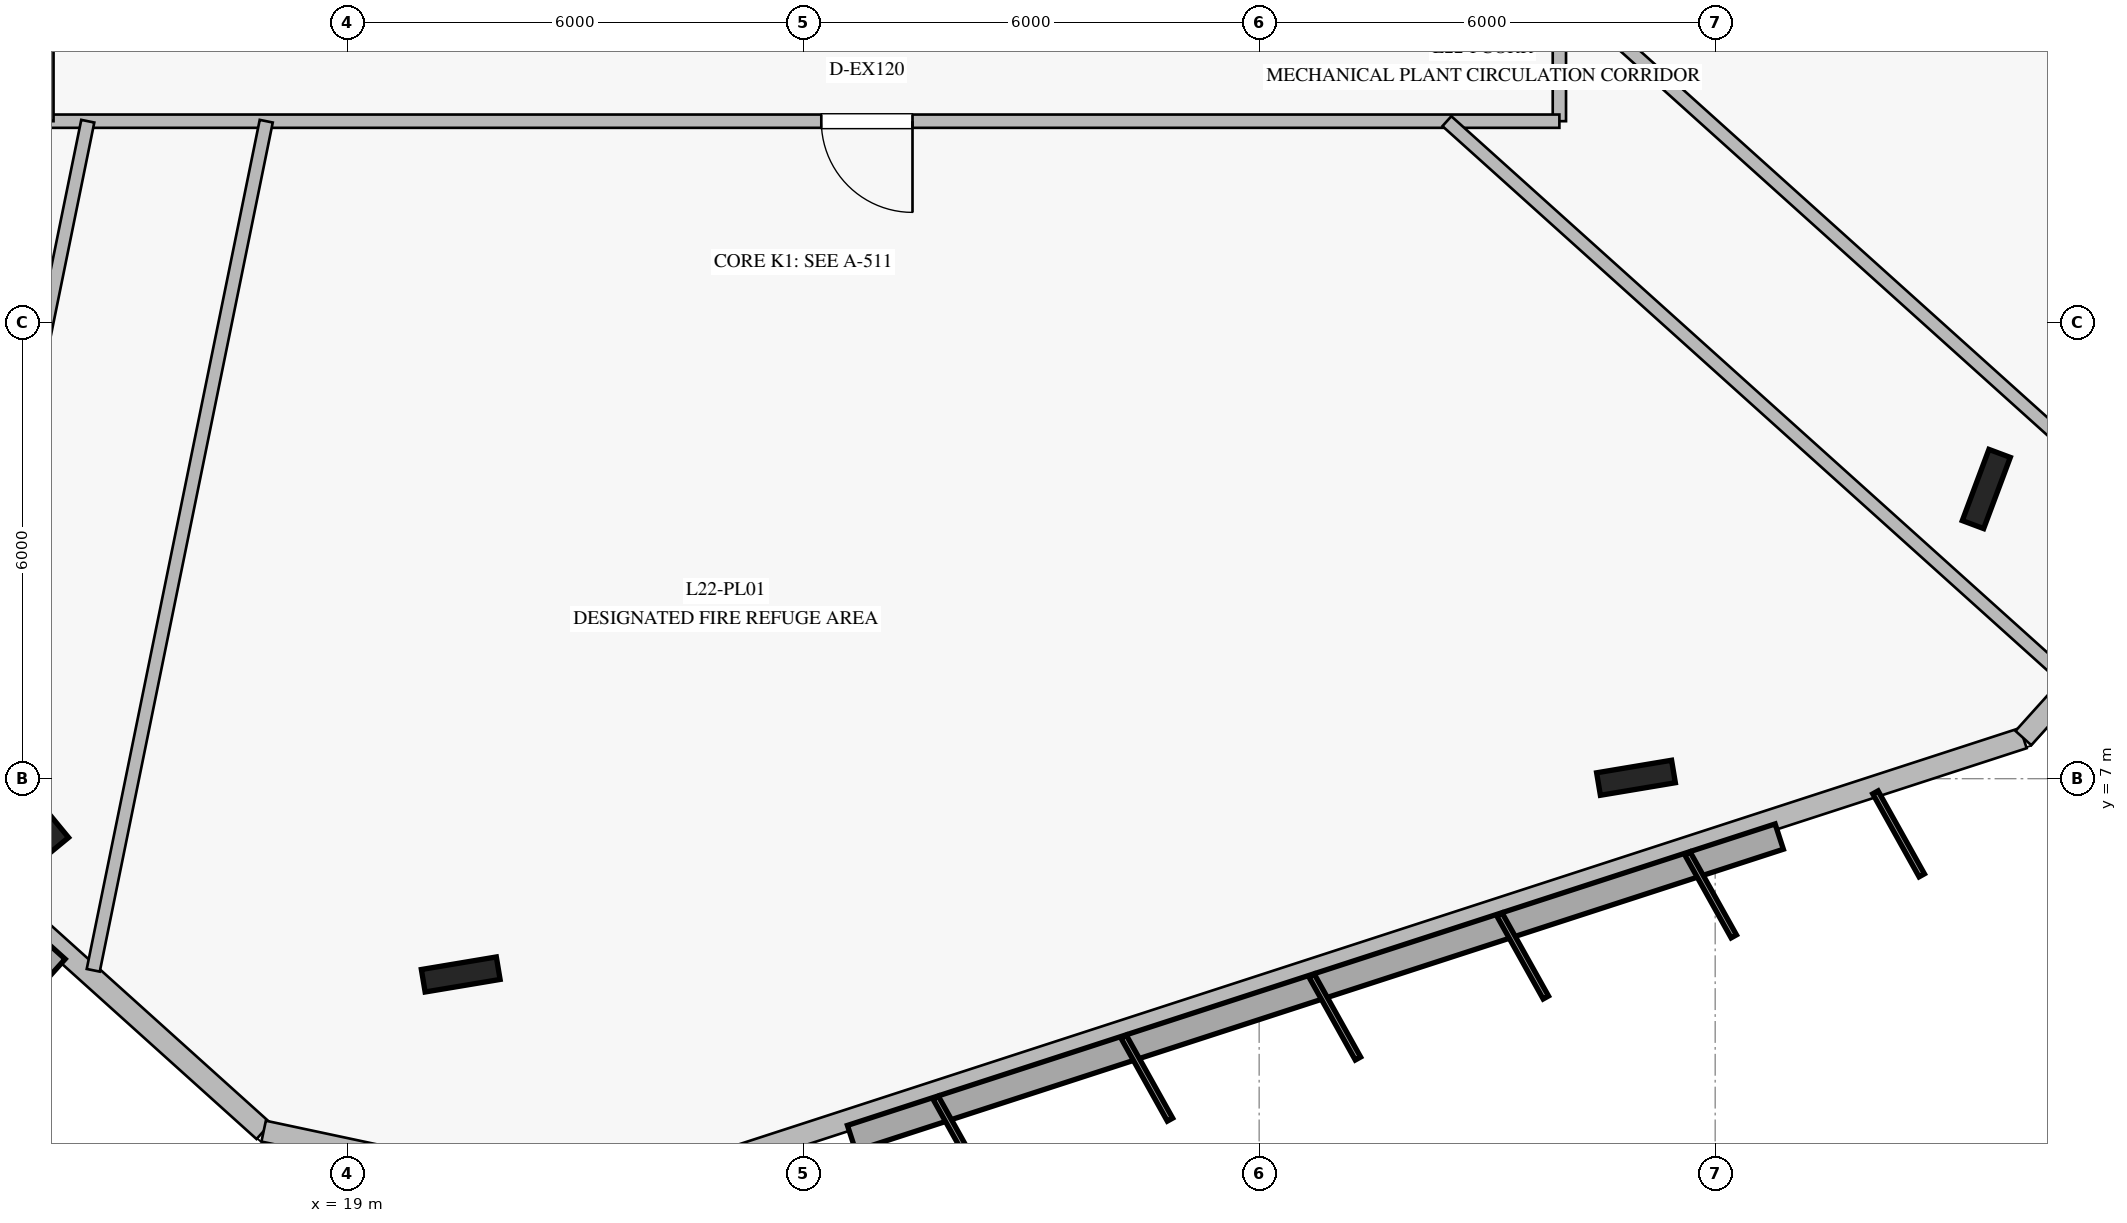
"""IFC4 building model, lengths in metres.
Left out: names, types, materials, properties, quantities, classifications, styles, units other than length and angle.
Written with IfcOpenShell. Run it as: python <this file> out.ifc"""

import sys

from ifc_helpers import new_model, si_unit, direction, frame, frame_2d, origin, origin_2d, place, context, subcontext, project, spatial, rectangle, i_section, extrude, element, fill, save


model = new_model("IFC4")
c1 = context("Model", 3, precision=1e-05, world=origin(), true_north=direction((0.0, 1.0)))
c2 = subcontext(c1, "Body", "Model", "MODEL_VIEW")
j1 = project(units=[si_unit("LENGTHUNIT", "METRE"), si_unit("PLANEANGLEUNIT", "RADIAN")], contexts=[c1])
p1 = place(None, origin())
s1 = spatial("IfcSite", under=j1, at=p1, CompositionType="ELEMENT")
p2 = place(p1, origin())
s2 = spatial("IfcBuilding", under=s1, at=p2, CompositionType="ELEMENT")
p3 = place(p2, frame((0.0, 0.0, 92.0)))
s3 = spatial("IfcBuildingStorey", under=s2, at=p3, CompositionType="ELEMENT", Elevation=92.0)
for number, where, z_axis, x_axis in (
    (1, (14.901, 6.516, 0.0), (0.0, 0.0, 1.0), (-0.636, 0.772, 0.0)),
    (2, (20.495, 4.424, 0.0), (0.0, 0.0, 1.0), (0.986, 0.165, 0.0)),
    (3, (35.958, 7.012, 0.0), (0.0, 0.0, 1.0), (0.986, 0.165, 0.0)),
    (4, (40.567, 10.811, 0.0), (0.0, 0.0, 1.0), (0.35, 0.937, 0.0)),
):
    element("IfcColumn", number, at=place(p3, frame(where, z_axis=z_axis, x_axis=x_axis)), inside=s3, PredefinedType="COLUMN", context=c2, shape_type="SweptSolid", body=[
        extrude(i_section(OverallWidth=0.3, OverallDepth=1.0, WebThickness=0.019, FlangeThickness=0.036, at=origin_2d()), origin(), (0.0, 0.0, 1.0), 5.4),
    ])
p4 = place(p3, frame((3.228, 15.575, 0.0), z_axis=(0.0, 0.0, 1.0), x_axis=(0.743161948842, -0.669111588446, 0.0)))
e5 = element("IfcWall", 5, at=p4, inside=s3, PredefinedType="STANDARD", context=c2, shape_type="SweptSolid", body=[
    extrude(rectangle(XDim=19.745, YDim=0.28, at=frame_2d((9.873, 0.0))), origin(), (0.0, 0.0, 1.0), 5.14),
])
p5 = place(p3, frame((17.902, 2.363, 0.0), z_axis=(0.0, 0.0, 1.0), x_axis=(0.978092216597, -0.20817208226, 0.0)))
e6 = element("IfcWall", 6, at=p5, inside=s3, PredefinedType="STANDARD", context=c2, shape_type="SweptSolid", body=[
    extrude(rectangle(XDim=4.473, YDim=0.28, at=frame_2d((2.236, 0.0))), origin(), (0.0, 0.0, 1.0), 5.14),
])
p6 = place(p3, frame((22.277, 1.432, 0.0), z_axis=(0.0, 0.0, 1.0), x_axis=(0.951045154023, 0.309051961667, 0.0)))
e7 = element("IfcWall", 7, at=p6, inside=s3, PredefinedType="STANDARD", context=c2, shape_type="SweptSolid", body=[
    extrude(rectangle(XDim=19.744, YDim=0.28, at=frame_2d((9.872, 0.0))), origin(), (0.0, 0.0, 1.0), 5.14),
])
p7 = place(p3, frame((41.055, 7.534, 0.0), z_axis=(0.0, 0.0, 1.0), x_axis=(0.669281253692, 0.743009154356, 0.0)))
e8 = element("IfcWall", 8, at=p7, inside=s3, PredefinedType="STANDARD", context=c2, shape_type="SweptSolid", body=[
    extrude(rectangle(XDim=4.474, YDim=0.28, at=frame_2d((2.237, 0.0))), origin(), (0.0, 0.0, 1.0), 5.14),
])
p8 = place(p3, frame((34.95, 34.35, 0.0), z_axis=(0.0, 0.0, 1.0), x_axis=(0.0, -1.0, 0.0)))
e9 = element("IfcWall", 9, at=p8, inside=s3, PredefinedType="PARTITIONING", context=c2, shape_type="SweptSolid", body=[
    extrude(rectangle(XDim=18.7, YDim=0.175, at=frame_2d((9.35, 0.0))), origin(), (0.0, 0.0, 1.0), 3.54),
])
p9 = place(p8, frame((8.013, 0.0, 0.0)))
e10 = element("IfcOpeningElement", 10, at=p9, cuts=e9, PredefinedType="OPENING", context=c2, shape_type="SweptSolid", body=[
    extrude(rectangle(XDim=1.15, YDim=2.2, at=frame_2d((0.575, 1.1))), frame((0.0, 0.098, 0.0), z_axis=(0.0, -1.0, 0.0), x_axis=(1.0, 0.0, 0.0)), (0.0, 0.0, 1.0), 0.195),
])
p10 = place(p3, frame((34.95, 15.65, 0.0), z_axis=(0.0, 0.0, 1.0), x_axis=(-1.0, 0.0, 0.0)))
e11 = element("IfcWall", 11, at=p10, inside=s3, PredefinedType="PARTITIONING", context=c2, shape_type="SweptSolid", body=[
    extrude(rectangle(XDim=19.9, YDim=0.175, at=frame_2d((9.95, 0.0))), origin(), (0.0, 0.0, 1.0), 3.54),
])
p11 = place(p10, frame((8.511, 0.0, 0.0)))
e12 = element("IfcOpeningElement", 12, at=p11, cuts=e11, PredefinedType="OPENING", context=c2, shape_type="SweptSolid", body=[
    extrude(rectangle(XDim=1.2, YDim=2.25, at=frame_2d((0.6, 1.125))), frame((0.0, 0.098, 0.0), z_axis=(0.0, -1.0, 0.0), x_axis=(1.0, 0.0, 0.0)), (0.0, 0.0, 1.0), 0.195),
])
p12 = place(p3, frame((15.05, 15.65, 0.0), z_axis=(0.0, 0.0, 1.0), x_axis=(0.0, 1.0, 0.0)))
e13 = element("IfcWall", 13, at=p12, inside=s3, PredefinedType="PARTITIONING", context=c2, shape_type="SweptSolid", body=[
    extrude(rectangle(XDim=18.7, YDim=0.175, at=frame_2d((9.35, 0.0))), origin(), (0.0, 0.0, 1.0), 3.54),
])
p13 = place(p12, frame((8.191, 0.0, 0.0)))
e14 = element("IfcOpeningElement", 14, at=p13, cuts=e13, PredefinedType="OPENING", context=c2, shape_type="SweptSolid", body=[
    extrude(rectangle(XDim=1.15, YDim=2.2, at=frame_2d((0.575, 1.1))), frame((0.0, 0.098, 0.0), z_axis=(0.0, -1.0, 0.0), x_axis=(1.0, 0.0, 0.0)), (0.0, 0.0, 1.0), 0.195),
])
p14 = place(p3, frame((15.588, 15.65, 0.0), z_axis=(0.0, 0.0, 1.0), x_axis=(-0.199614906569, -0.979874425156, 0.0)))
e15 = element("IfcWall", 15, at=p14, inside=s3, PredefinedType="PARTITIONING", context=c2, shape_type="SweptSolid", body=[
    extrude(rectangle(XDim=9.578, YDim=0.175, at=frame_2d((4.789, 0.0))), origin(), (0.0, 0.0, 1.0), 3.53),
])
p15 = place(p3, frame((17.936, 15.65, 0.0), z_axis=(0.0, 0.0, 1.0), x_axis=(-0.199652459502, -0.979866774319, 0.0)))
e16 = element("IfcWall", 16, at=p15, inside=s3, PredefinedType="PARTITIONING", context=c2, shape_type="SweptSolid", body=[
    extrude(rectangle(XDim=11.4, YDim=0.175, at=frame_2d((5.7, 0.0))), origin(), (0.0, 0.0, 1.0), 3.53),
])
p16 = place(p3, frame((33.47, 15.65, 0.0), z_axis=(0.0, 0.0, 1.0), x_axis=(0.743388992032, -0.66885933239, 0.0)))
e17 = element("IfcWall", 17, at=p16, inside=s3, PredefinedType="PARTITIONING", context=c2, shape_type="SweptSolid", body=[
    extrude(rectangle(XDim=11.007, YDim=0.175, at=frame_2d((5.503, 0.0))), origin(), (0.0, 0.0, 1.0), 3.53),
])
p17 = place(p3, frame((34.95, 17.412, 0.0), z_axis=(0.0, 0.0, 1.0), x_axis=(0.743376269503, -0.668873472295, 0.0)))
e18 = element("IfcWall", 18, at=p17, inside=s3, PredefinedType="PARTITIONING", context=c2, shape_type="SweptSolid", body=[
    extrude(rectangle(XDim=11.086, YDim=0.175, at=frame_2d((5.543, 0.0))), origin(), (0.0, 0.0, 1.0), 3.53),
])
p18 = place(p11, origin())
e19 = element("IfcDoor", 19, at=p18, inside=s3, OperationType="SINGLE_SWING_LEFT", PredefinedType="DOOR", context=c2, shape_type="SweptSolid", body=[
    extrude(rectangle(XDim=1.2, YDim=2.25, at=frame_2d((0.6, 1.125))), frame((0.0, 0.025, 0.0), z_axis=(0.0, -1.0, 0.0), x_axis=(1.0, 0.0, 0.0)), (0.0, 0.0, 1.0), 0.05),
])
fill(e12, e19)
save(model, sys.argv[1])
